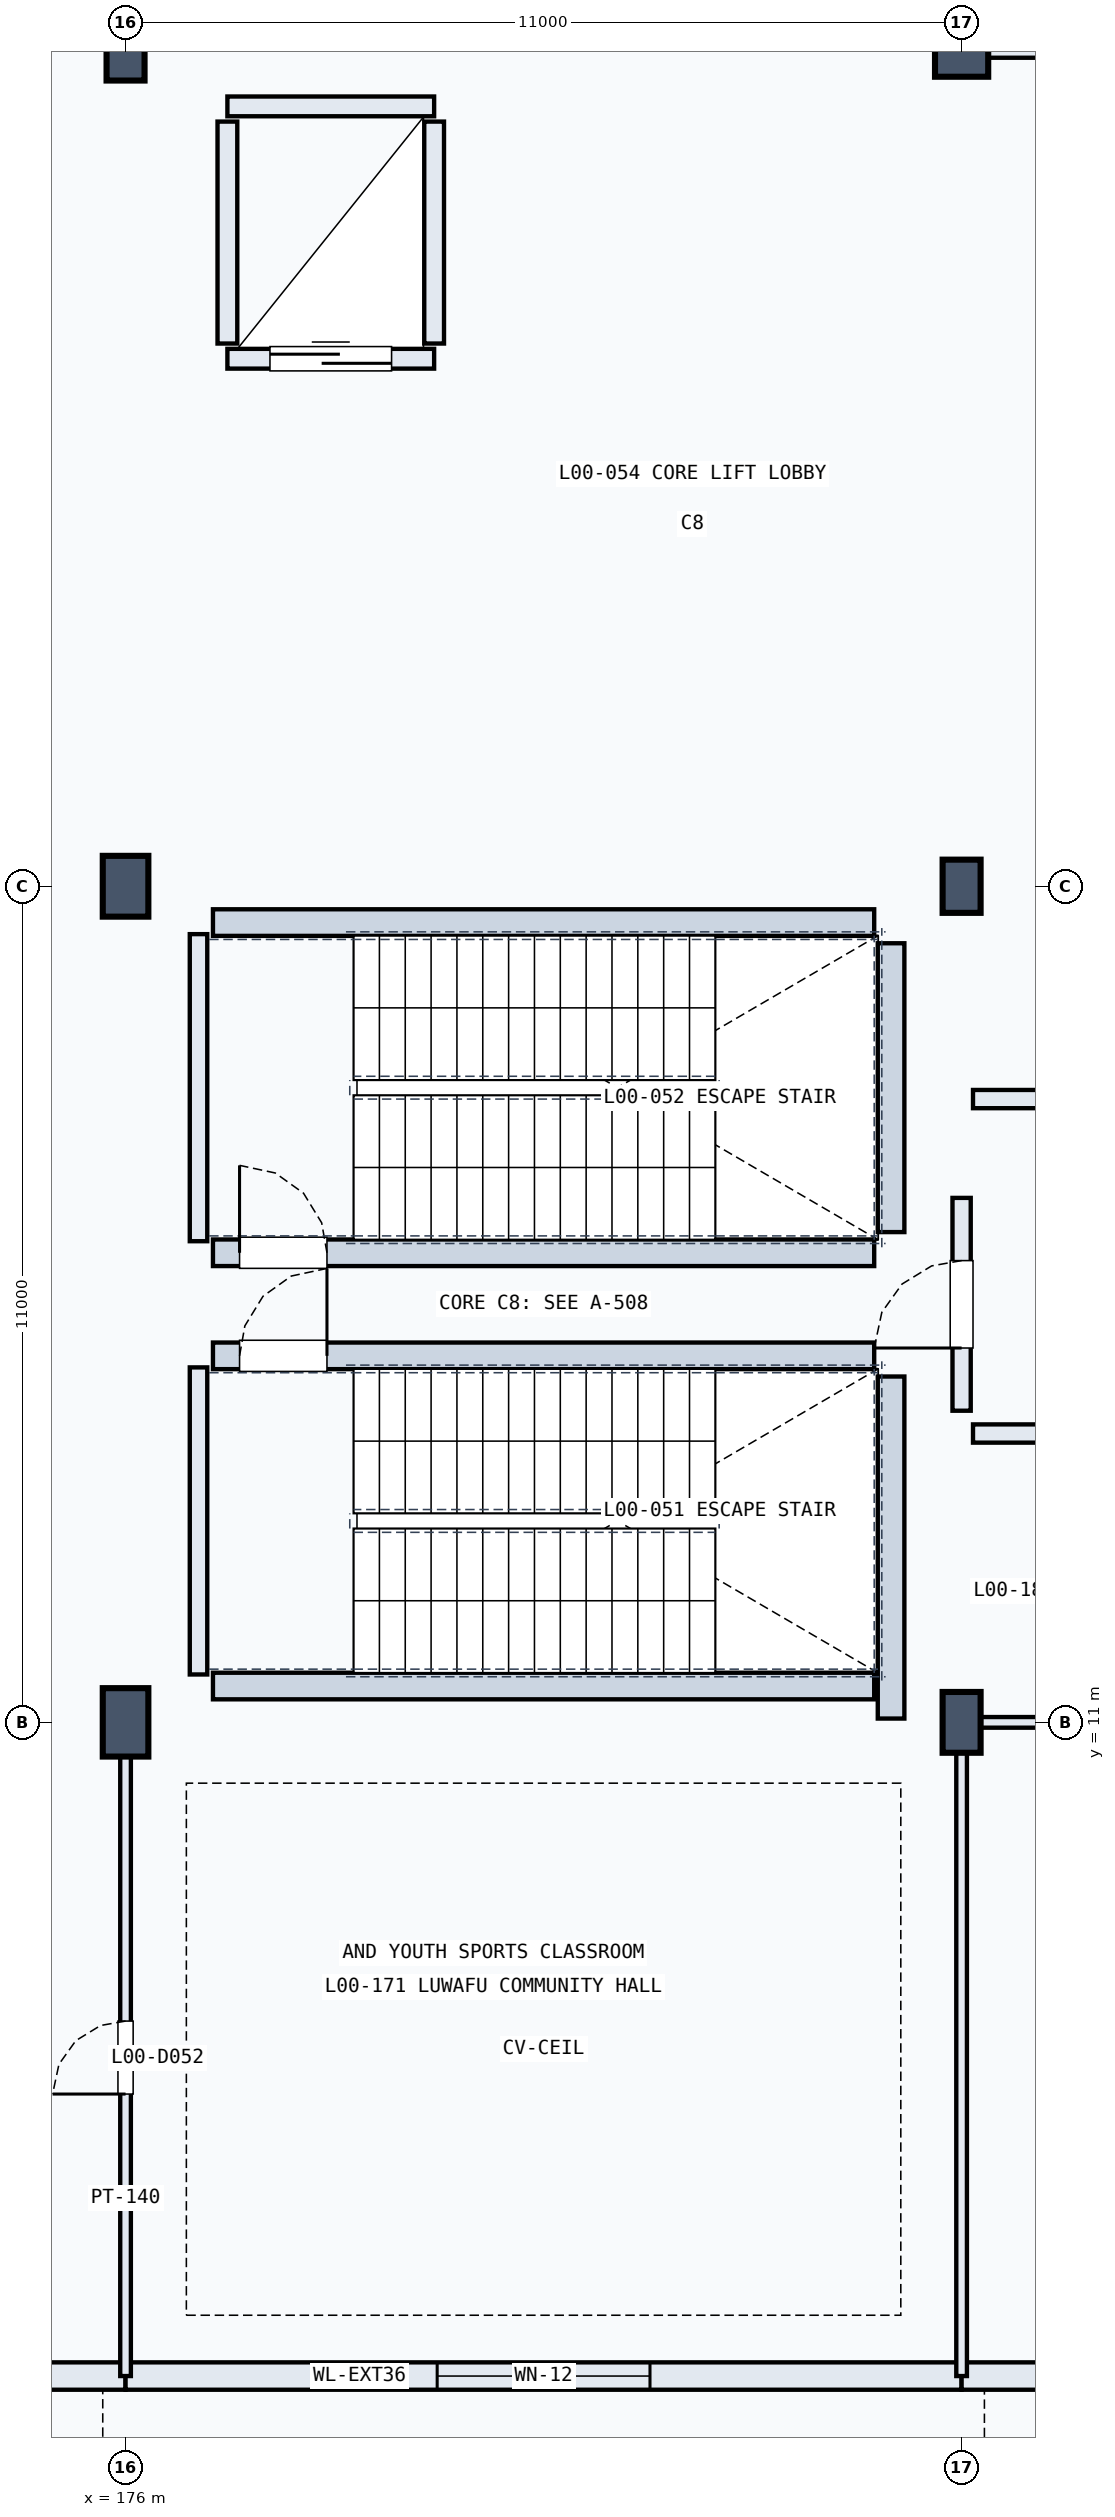
"""IFC4 building model, lengths in metres.
Left out: names, types, materials, properties, quantities, classifications, styles, units other than length and angle.
Written with IfcOpenShell. Run it as: python <this file> out.ifc"""

import sys

from ifc_helpers import new_model, si_unit, direction, frame, frame_2d, origin, origin_2d, place, context, subcontext, project, spatial, rectangle, extrude, element, fill, save


model = new_model("IFC4")
c1 = context("Model", 3, precision=1e-05, world=origin(), true_north=direction((0.0, 1.0)))
c2 = subcontext(c1, "Body", "Model", "MODEL_VIEW")
j1 = project(units=[si_unit("LENGTHUNIT", "METRE"), si_unit("PLANEANGLEUNIT", "RADIAN")], contexts=[c1])
p1 = place(None, origin())
s1 = spatial("IfcSite", under=j1, at=p1, CompositionType="ELEMENT")
p2 = place(p1, origin())
s2 = spatial("IfcBuilding", under=s1, at=p2, CompositionType="ELEMENT")
p3 = place(p2, origin())
s3 = spatial("IfcBuildingStorey", under=s2, at=p3, CompositionType="ELEMENT", Elevation=0.0)
p4 = place(p3, frame((176.0, 11.0, 0.0), z_axis=(0.0, 0.0, 1.0), x_axis=(1.0, 0.0, 0.0)))
e1 = element("IfcColumn", 1, at=p4, inside=s3, PredefinedType="COLUMN", context=c2, shape_type="SweptSolid", body=[
    extrude(rectangle(XDim=0.6, YDim=0.9, at=origin_2d()), origin(), (0.0, 0.0, 1.0), 5.4),
])
p5 = place(p3, frame((176.0, 22.0, 0.0), z_axis=(0.0, 0.0, 1.0), x_axis=(1.0, 0.0, 0.0)))
e2 = element("IfcColumn", 2, at=p5, inside=s3, PredefinedType="COLUMN", context=c2, shape_type="SweptSolid", body=[
    extrude(rectangle(XDim=0.6, YDim=0.8, at=origin_2d()), origin(), (0.0, 0.0, 1.0), 5.4),
])
for number, where, z_axis, x_axis in (
    (3, (176.0, 33.0, 0.0), (0.0, 0.0, 1.0), (1.0, 0.0, 0.0)),
    (4, (187.0, 11.0, 0.0), (0.0, 0.0, 1.0), (1.0, 0.0, 0.0)),
):
    element("IfcColumn", number, at=place(p3, frame(where, z_axis=z_axis, x_axis=x_axis)), inside=s3, PredefinedType="COLUMN", context=c2, shape_type="SweptSolid", body=[
        extrude(rectangle(XDim=0.5, YDim=0.8, at=origin_2d()), origin(), (0.0, 0.0, 1.0), 5.4),
    ])
p6 = place(p3, frame((187.0, 22.0, 0.0), z_axis=(0.0, 0.0, 1.0), x_axis=(1.0, 0.0, 0.0)))
e5 = element("IfcColumn", 5, at=p6, inside=s3, PredefinedType="COLUMN", context=c2, shape_type="SweptSolid", body=[
    extrude(rectangle(XDim=0.5, YDim=0.7, at=origin_2d()), origin(), (0.0, 0.0, 1.0), 5.4),
])
p7 = place(p3, frame((187.0, 33.0, 0.0), z_axis=(0.0, 0.0, 1.0), x_axis=(1.0, 0.0, 0.0)))
e6 = element("IfcColumn", 6, at=p7, inside=s3, PredefinedType="COLUMN", context=c2, shape_type="SweptSolid", body=[
    extrude(rectangle(XDim=0.7, YDim=0.7, at=origin_2d()), origin(), (0.0, 0.0, 1.0), 5.4),
])
p8 = place(p3, frame((164.0, 2.4, 0.0), z_axis=(0.0, 0.0, 1.0), x_axis=(1.0, 0.0, 0.0)))
e7 = element("IfcWall", 7, at=p8, inside=s3, PredefinedType="SOLIDWALL", context=c2, shape_type="SweptSolid", body=[
    extrude(rectangle(XDim=12.0, YDim=0.36, at=frame_2d((6.0, 0.0))), origin(), (0.0, 0.0, 1.0), 4.43),
])
p9 = place(p8, frame((1.87, 0.0, 0.0)))
e8 = element("IfcOpeningElement", 8, at=p9, cuts=e7, PredefinedType="OPENING", context=c2, shape_type="SweptSolid", body=[
    extrude(rectangle(XDim=2.2, YDim=2.35, at=frame_2d((1.1, 1.175))), frame((0.0, 0.19, 0.0), z_axis=(0.0, -1.0, 0.0), x_axis=(1.0, 0.0, 0.0)), (0.0, 0.0, 1.0), 0.38),
])
p10 = place(p8, frame((7.63, 0.0, 0.0)))
e9 = element("IfcOpeningElement", 9, at=p10, cuts=e7, PredefinedType="OPENING", context=c2, shape_type="SweptSolid", body=[
    extrude(rectangle(XDim=2.2, YDim=2.35, at=frame_2d((1.1, 1.175))), frame((0.0, 0.19, 0.0), z_axis=(0.0, -1.0, 0.0), x_axis=(1.0, 0.0, 0.0)), (0.0, 0.0, 1.0), 0.38),
])
p11 = place(p8, frame((5.0, 0.0, 0.9)))
e10 = element("IfcOpeningElement", 10, at=p11, cuts=e7, PredefinedType="OPENING", context=c2, shape_type="SweptSolid", body=[
    extrude(rectangle(XDim=2.0, YDim=1.65, at=frame_2d((1.0, 0.825))), frame((0.0, 0.19, 0.0), z_axis=(0.0, -1.0, 0.0), x_axis=(1.0, 0.0, 0.0)), (0.0, 0.0, 1.0), 0.38),
])
p12 = place(p3, frame((176.0, 2.4, 0.0), z_axis=(0.0, 0.0, 1.0), x_axis=(1.0, 0.0, 0.0)))
e11 = element("IfcWall", 11, at=p12, inside=s3, PredefinedType="SOLIDWALL", context=c2, shape_type="SweptSolid", body=[
    extrude(rectangle(XDim=11.0, YDim=0.36, at=frame_2d((5.5, 0.0))), origin(), (0.0, 0.0, 1.0), 4.45),
])
p13 = place(p12, frame((4.1, 0.0, 0.95)))
e12 = element("IfcOpeningElement", 12, at=p13, cuts=e11, PredefinedType="OPENING", context=c2, shape_type="SweptSolid", body=[
    extrude(rectangle(XDim=2.8, YDim=1.5, at=frame_2d((1.4, 0.75))), frame((0.0, 0.19, 0.0), z_axis=(0.0, -1.0, 0.0), x_axis=(1.0, 0.0, 0.0)), (0.0, 0.0, 1.0), 0.38),
])
p14 = place(p3, frame((187.0, 2.4, 0.0), z_axis=(0.0, 0.0, 1.0), x_axis=(1.0, 0.0, 0.0)))
e13 = element("IfcWall", 13, at=p14, inside=s3, PredefinedType="SOLIDWALL", context=c2, shape_type="SweptSolid", body=[
    extrude(rectangle(XDim=11.0, YDim=0.36, at=frame_2d((5.5, 0.0))), origin(), (0.0, 0.0, 1.0), 4.45),
])
p15 = place(p14, frame((2.075, 0.0, 0.8)))
e14 = element("IfcOpeningElement", 14, at=p15, cuts=e13, PredefinedType="OPENING", context=c2, shape_type="SweptSolid", body=[
    extrude(rectangle(XDim=1.35, YDim=2.1, at=frame_2d((0.675, 1.05))), frame((0.0, 0.19, 0.0), z_axis=(0.0, -1.0, 0.0), x_axis=(1.0, 0.0, 0.0)), (0.0, 0.0, 1.0), 0.38),
])
p16 = place(p14, frame((4.825, 0.0, 0.8)))
e15 = element("IfcOpeningElement", 15, at=p16, cuts=e13, PredefinedType="OPENING", context=c2, shape_type="SweptSolid", body=[
    extrude(rectangle(XDim=1.35, YDim=2.1, at=frame_2d((0.675, 1.05))), frame((0.0, 0.19, 0.0), z_axis=(0.0, -1.0, 0.0), x_axis=(1.0, 0.0, 0.0)), (0.0, 0.0, 1.0), 0.38),
])
p17 = place(p14, frame((7.575, 0.0, 0.8)))
e16 = element("IfcOpeningElement", 16, at=p17, cuts=e13, PredefinedType="OPENING", context=c2, shape_type="SweptSolid", body=[
    extrude(rectangle(XDim=1.35, YDim=2.1, at=frame_2d((0.675, 1.05))), frame((0.0, 0.19, 0.0), z_axis=(0.0, -1.0, 0.0), x_axis=(1.0, 0.0, 0.0)), (0.0, 0.0, 1.0), 0.38),
])
p18 = place(p3, frame((176.96, 11.63, 0.0), z_axis=(0.0, 0.0, 1.0), x_axis=(0.0, 1.0, 0.0)))
e17 = element("IfcWall", 17, at=p18, inside=s3, PredefinedType="SOLIDWALL", context=c2, shape_type="SweptSolid", body=[
    extrude(rectangle(XDim=4.04, YDim=0.23, at=frame_2d((2.02, 0.0))), origin(), (0.0, 0.0, 1.0), 5.06),
])
p19 = place(p3, frame((186.072, 11.05, 0.0), z_axis=(0.0, 0.0, 1.0), x_axis=(0.0, 1.0, 0.0)))
e18 = element("IfcWall", 18, at=p19, inside=s3, PredefinedType="SOLIDWALL", context=c2, shape_type="SweptSolid", body=[
    extrude(rectangle(XDim=4.5, YDim=0.35, at=frame_2d((2.25, 0.0))), origin(), (0.0, 0.0, 1.0), 5.06),
])
p20 = place(p3, frame((177.15, 11.478, 0.0), z_axis=(0.0, 0.0, 1.0), x_axis=(1.0, 0.0, 0.0)))
e19 = element("IfcWall", 19, at=p20, inside=s3, PredefinedType="SOLIDWALL", context=c2, shape_type="SweptSolid", body=[
    extrude(rectangle(XDim=8.7, YDim=0.35, at=frame_2d((4.35, 0.0))), origin(), (0.0, 0.0, 1.0), 5.06),
])
p21 = place(p3, frame((177.15, 15.822, 0.0), z_axis=(0.0, 0.0, 1.0), x_axis=(1.0, 0.0, 0.0)))
e20 = element("IfcWall", 20, at=p21, inside=s3, PredefinedType="SOLIDWALL", context=c2, shape_type="SweptSolid", body=[
    extrude(rectangle(XDim=8.7, YDim=0.35, at=frame_2d((4.35, 0.0))), origin(), (0.0, 0.0, 1.0), 5.06),
])
p22 = place(p21, frame((0.35, 0.0, 0.0)))
e21 = element("IfcOpeningElement", 21, at=p22, cuts=e20, PredefinedType="OPENING", context=c2, shape_type="SweptSolid", body=[
    extrude(rectangle(XDim=1.15, YDim=2.2, at=frame_2d((0.575, 1.1))), frame((0.0, 0.185, 0.0), z_axis=(0.0, -1.0, 0.0), x_axis=(1.0, 0.0, 0.0)), (0.0, 0.0, 1.0), 0.37),
])
p23 = place(p3, frame((176.96, 17.33, 0.0), z_axis=(0.0, 0.0, 1.0), x_axis=(0.0, 1.0, 0.0)))
e22 = element("IfcWall", 22, at=p23, inside=s3, PredefinedType="SOLIDWALL", context=c2, shape_type="SweptSolid", body=[
    extrude(rectangle(XDim=4.04, YDim=0.23, at=frame_2d((2.02, 0.0))), origin(), (0.0, 0.0, 1.0), 5.06),
])
p24 = place(p3, frame((186.072, 17.45, 0.0), z_axis=(0.0, 0.0, 1.0), x_axis=(0.0, 1.0, 0.0)))
e23 = element("IfcWall", 23, at=p24, inside=s3, PredefinedType="SOLIDWALL", context=c2, shape_type="SweptSolid", body=[
    extrude(rectangle(XDim=3.8, YDim=0.35, at=frame_2d((1.9, 0.0))), origin(), (0.0, 0.0, 1.0), 5.06),
])
p25 = place(p3, frame((177.15, 17.178, 0.0), z_axis=(0.0, 0.0, 1.0), x_axis=(1.0, 0.0, 0.0)))
e24 = element("IfcWall", 24, at=p25, inside=s3, PredefinedType="SOLIDWALL", context=c2, shape_type="SweptSolid", body=[
    extrude(rectangle(XDim=8.7, YDim=0.35, at=frame_2d((4.35, 0.0))), origin(), (0.0, 0.0, 1.0), 5.06),
])
p26 = place(p25, frame((0.35, 0.0, 0.0)))
e25 = element("IfcOpeningElement", 25, at=p26, cuts=e24, PredefinedType="OPENING", context=c2, shape_type="SweptSolid", body=[
    extrude(rectangle(XDim=1.15, YDim=2.2, at=frame_2d((0.575, 1.1))), frame((0.0, 0.185, 0.0), z_axis=(0.0, -1.0, 0.0), x_axis=(1.0, 0.0, 0.0)), (0.0, 0.0, 1.0), 0.37),
])
p27 = place(p3, frame((177.15, 21.522, 0.0), z_axis=(0.0, 0.0, 1.0), x_axis=(1.0, 0.0, 0.0)))
e26 = element("IfcWall", 26, at=p27, inside=s3, PredefinedType="SOLIDWALL", context=c2, shape_type="SweptSolid", body=[
    extrude(rectangle(XDim=8.7, YDim=0.35, at=frame_2d((4.35, 0.0))), origin(), (0.0, 0.0, 1.0), 5.06),
])
p28 = place(p3, frame((177.34, 28.94, 0.0), z_axis=(0.0, 0.0, 1.0), x_axis=(1.0, 0.0, 0.0)))
e27 = element("IfcWall", 27, at=p28, inside=s3, PredefinedType="SOLIDWALL", context=c2, shape_type="SweptSolid", body=[
    extrude(rectangle(XDim=2.72, YDim=0.26, at=frame_2d((1.36, 0.0))), origin(), (0.0, 0.0, 1.0), 5.06),
])
p29 = place(p28, frame((0.56, 0.0, 0.0)))
e28 = element("IfcOpeningElement", 28, at=p29, cuts=e27, PredefinedType="OPENING", context=c2, shape_type="SweptSolid", body=[
    extrude(rectangle(XDim=1.6, YDim=2.35, at=frame_2d((0.8, 1.175))), frame((0.0, 0.14, 0.0), z_axis=(0.0, -1.0, 0.0), x_axis=(1.0, 0.0, 0.0)), (0.0, 0.0, 1.0), 0.28),
])
p30 = place(p3, frame((177.34, 32.26, 0.0), z_axis=(0.0, 0.0, 1.0), x_axis=(1.0, 0.0, 0.0)))
e29 = element("IfcWall", 29, at=p30, inside=s3, PredefinedType="SOLIDWALL", context=c2, shape_type="SweptSolid", body=[
    extrude(rectangle(XDim=2.72, YDim=0.26, at=frame_2d((1.36, 0.0))), origin(), (0.0, 0.0, 1.0), 5.06),
])
for number, where, z_axis, x_axis in (
    (30, (177.34, 29.14, 0.0), (0.0, 0.0, 1.0), (0.0, 1.0, 0.0)),
    (31, (180.06, 29.14, 0.0), (0.0, 0.0, 1.0), (0.0, 1.0, 0.0)),
):
    element("IfcWall", number, at=place(p3, frame(where, z_axis=z_axis, x_axis=x_axis)), inside=s3, PredefinedType="SOLIDWALL", context=c2, shape_type="SweptSolid", body=[
        extrude(rectangle(XDim=2.92, YDim=0.26, at=frame_2d((1.46, 0.0))), origin(), (0.0, 0.0, 1.0), 5.06),
    ])
p31 = place(p3, frame((176.0, 2.4, 0.0), z_axis=(0.0, 0.0, 1.0), x_axis=(0.0, 1.0, 0.0)))
e32 = element("IfcWall", 32, at=p31, inside=s3, PredefinedType="PARTITIONING", context=c2, shape_type="SweptSolid", body=[
    extrude(rectangle(XDim=8.38, YDim=0.14, at=frame_2d((4.19, 0.0))), origin(), (0.0, 0.0, 1.0), 4.366),
])
p32 = place(p31, frame((3.71, 0.0, 0.0)))
e33 = element("IfcOpeningElement", 33, at=p32, cuts=e32, PredefinedType="OPENING", context=c2, shape_type="SweptSolid", body=[
    extrude(rectangle(XDim=0.96, YDim=2.15, at=frame_2d((0.48, 1.075))), frame((0.0, 0.08, 0.0), z_axis=(0.0, -1.0, 0.0), x_axis=(1.0, 0.0, 0.0)), (0.0, 0.0, 1.0), 0.16),
])
p33 = place(p3, frame((187.22, 11.0, 0.0), z_axis=(0.0, 0.0, 1.0), x_axis=(1.0, 0.0, 0.0)))
e34 = element("IfcWall", 34, at=p33, inside=s3, PredefinedType="PARTITIONING", context=c2, shape_type="SweptSolid", body=[
    extrude(rectangle(XDim=10.3, YDim=0.14, at=frame_2d((5.15, 0.0))), origin(), (0.0, 0.0, 1.0), 4.25),
])
p34 = place(p33, frame((4.34, 0.0, 0.0)))
e35 = element("IfcOpeningElement", 35, at=p34, cuts=e34, PredefinedType="OPENING", context=c2, shape_type="SweptSolid", body=[
    extrude(rectangle(XDim=1.62, YDim=2.25, at=frame_2d((0.81, 1.125))), frame((0.0, 0.08, 0.0), z_axis=(0.0, -1.0, 0.0), x_axis=(1.0, 0.0, 0.0)), (0.0, 0.0, 1.0), 0.16),
])
p35 = place(p3, frame((187.22, 33.0, 0.0), z_axis=(0.0, 0.0, 1.0), x_axis=(1.0, 0.0, 0.0)))
e36 = element("IfcWall", 36, at=p35, inside=s3, PredefinedType="PARTITIONING", context=c2, shape_type="SweptSolid", body=[
    extrude(rectangle(XDim=10.3, YDim=0.2, at=frame_2d((5.15, 0.0))), origin(), (0.0, 0.0, 1.0), 4.3),
])
p36 = place(p35, frame((4.68, 0.0, 0.0)))
e37 = element("IfcOpeningElement", 37, at=p36, cuts=e36, PredefinedType="OPENING", context=c2, shape_type="SweptSolid", body=[
    extrude(rectangle(XDim=0.94, YDim=2.15, at=frame_2d((0.47, 1.075))), frame((0.0, 0.11, 0.0), z_axis=(0.0, -1.0, 0.0), x_axis=(1.0, 0.0, 0.0)), (0.0, 0.0, 1.0), 0.22),
])
p37 = place(p3, frame((187.0, 2.4, 0.0), z_axis=(0.0, 0.0, 1.0), x_axis=(0.0, 1.0, 0.0)))
e38 = element("IfcWall", 38, at=p37, inside=s3, PredefinedType="PARTITIONING", context=c2, shape_type="SweptSolid", body=[
    extrude(rectangle(XDim=8.38, YDim=0.14, at=frame_2d((4.19, 0.0))), origin(), (0.0, 0.0, 1.0), 4.25),
])
p38 = place(p3, frame((187.15, 14.8, 0.0), z_axis=(0.0, 0.0, 1.0), x_axis=(1.0, 0.0, 0.0)))
e39 = element("IfcWall", 39, at=p38, inside=s3, PredefinedType="PARTITIONING", context=c2, shape_type="SweptSolid", body=[
    extrude(rectangle(XDim=10.65, YDim=0.24, at=frame_2d((5.325, 0.0))), origin(), (0.0, 0.0, 1.0), 4.25),
])
p39 = place(p38, frame((4.325, 0.0, 0.0)))
e40 = element("IfcOpeningElement", 40, at=p39, cuts=e39, PredefinedType="OPENING", context=c2, shape_type="SweptSolid", body=[
    extrude(rectangle(XDim=2.0, YDim=2.25, at=frame_2d((1.0, 1.125))), frame((0.0, 0.13, 0.0), z_axis=(0.0, -1.0, 0.0), x_axis=(1.0, 0.0, 0.0)), (0.0, 0.0, 1.0), 0.26),
])
p40 = place(p3, frame((187.15, 19.2, 0.0), z_axis=(0.0, 0.0, 1.0), x_axis=(1.0, 0.0, 0.0)))
e41 = element("IfcWall", 41, at=p40, inside=s3, PredefinedType="PARTITIONING", context=c2, shape_type="SweptSolid", body=[
    extrude(rectangle(XDim=10.65, YDim=0.24, at=frame_2d((5.325, 0.0))), origin(), (0.0, 0.0, 1.0), 4.25),
])
p41 = place(p40, frame((4.325, 0.0, 0.0)))
e42 = element("IfcOpeningElement", 42, at=p41, cuts=e41, PredefinedType="OPENING", context=c2, shape_type="SweptSolid", body=[
    extrude(rectangle(XDim=2.0, YDim=2.25, at=frame_2d((1.0, 1.125))), frame((0.0, 0.13, 0.0), z_axis=(0.0, -1.0, 0.0), x_axis=(1.0, 0.0, 0.0)), (0.0, 0.0, 1.0), 0.26),
])
p42 = place(p3, frame((187.0, 15.1, 0.0), z_axis=(0.0, 0.0, 1.0), x_axis=(0.0, 1.0, 0.0)))
e43 = element("IfcWall", 43, at=p42, inside=s3, PredefinedType="PARTITIONING", context=c2, shape_type="SweptSolid", body=[
    extrude(rectangle(XDim=2.8, YDim=0.24, at=frame_2d((1.4, 0.0))), origin(), (0.0, 0.0, 1.0), 4.25),
])
p43 = place(p42, frame((0.825, 0.0, 0.0)))
e44 = element("IfcOpeningElement", 44, at=p43, cuts=e43, PredefinedType="OPENING", context=c2, shape_type="SweptSolid", body=[
    extrude(rectangle(XDim=1.15, YDim=2.2, at=frame_2d((0.575, 1.1))), frame((0.0, 0.13, 0.0), z_axis=(0.0, -1.0, 0.0), x_axis=(1.0, 0.0, 0.0)), (0.0, 0.0, 1.0), 0.26),
])
p44 = place(p13, origin())
e45 = element("IfcWindow", 45, at=p44, inside=s3, PartitioningType="SINGLE_PANEL", PredefinedType="WINDOW", context=c2, shape_type="SweptSolid", body=[
    extrude(rectangle(XDim=2.8, YDim=1.5, at=frame_2d((1.4, 0.75))), frame((0.0, 0.03, 0.0), z_axis=(0.0, -1.0, 0.0), x_axis=(1.0, 0.0, 0.0)), (0.0, 0.0, 1.0), 0.06),
])
fill(e12, e45)
p45 = place(p22, origin())
e46 = element("IfcDoor", 46, at=p45, inside=s3, OperationType="SINGLE_SWING_RIGHT", PredefinedType="DOOR", context=c2, shape_type="SweptSolid", body=[
    extrude(rectangle(XDim=1.15, YDim=2.2, at=frame_2d((0.575, 1.1))), frame((0.0, 0.025, 0.0), z_axis=(0.0, -1.0, 0.0), x_axis=(1.0, 0.0, 0.0)), (0.0, 0.0, 1.0), 0.05),
])
fill(e21, e46)
p46 = place(p26, origin())
e47 = element("IfcDoor", 47, at=p46, inside=s3, OperationType="SINGLE_SWING_LEFT", PredefinedType="DOOR", context=c2, shape_type="SweptSolid", body=[
    extrude(rectangle(XDim=1.15, YDim=2.2, at=frame_2d((0.575, 1.1))), frame((0.0, 0.025, 0.0), z_axis=(0.0, -1.0, 0.0), x_axis=(1.0, 0.0, 0.0)), (0.0, 0.0, 1.0), 0.05),
])
fill(e25, e47)
p47 = place(p29, origin())
e48 = element("IfcDoor", 48, at=p47, inside=s3, OperationType="DOUBLE_DOOR_SLIDING", PredefinedType="DOOR", context=c2, shape_type="SweptSolid", body=[
    extrude(rectangle(XDim=1.6, YDim=2.35, at=frame_2d((0.8, 1.175))), frame((0.0, 0.025, 0.0), z_axis=(0.0, -1.0, 0.0), x_axis=(1.0, 0.0, 0.0)), (0.0, 0.0, 1.0), 0.05),
])
fill(e28, e48)
p48 = place(p32, origin())
e49 = element("IfcDoor", 49, at=p48, inside=s3, OperationType="SINGLE_SWING_LEFT", PredefinedType="DOOR", context=c2, shape_type="SweptSolid", body=[
    extrude(rectangle(XDim=0.96, YDim=2.15, at=frame_2d((0.48, 1.075))), frame((0.0, 0.025, 0.0), z_axis=(0.0, -1.0, 0.0), x_axis=(1.0, 0.0, 0.0)), (0.0, 0.0, 1.0), 0.05),
])
fill(e33, e49)
p49 = place(p43, origin())
e50 = element("IfcDoor", 50, at=p49, inside=s3, OperationType="SINGLE_SWING_LEFT", PredefinedType="DOOR", context=c2, shape_type="SweptSolid", body=[
    extrude(rectangle(XDim=1.15, YDim=2.2, at=frame_2d((0.575, 1.1))), frame((0.0, 0.025, 0.0), z_axis=(0.0, -1.0, 0.0), x_axis=(1.0, 0.0, 0.0)), (0.0, 0.0, 1.0), 0.05),
])
fill(e44, e50)
save(model, sys.argv[1])
